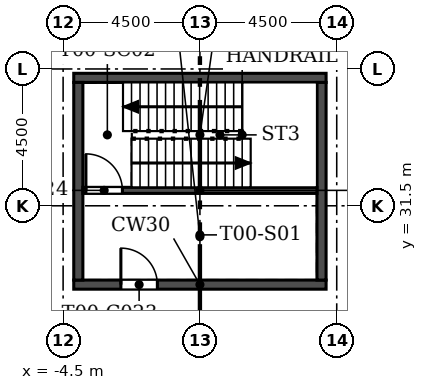
"""IFC4 building model, lengths in metres.
Left out: names, types, materials, properties, quantities, classifications, styles, units other than length and angle.
Written with IfcOpenShell. Run it as: python <this file> out.ifc"""

import sys

from ifc_helpers import new_model, si_unit, direction, frame, frame_2d, origin, place, context, subcontext, project, spatial, rectangle, extrude, element, fill, save


model = new_model("IFC4")
c1 = context("Model", 3, precision=1e-05, world=origin(), true_north=direction((0.0, 1.0)))
c2 = subcontext(c1, "Body", "Model", "MODEL_VIEW")
j1 = project(units=[si_unit("LENGTHUNIT", "METRE"), si_unit("PLANEANGLEUNIT", "RADIAN")], contexts=[c1])
p1 = place(None, origin())
s1 = spatial("IfcSite", under=j1, at=p1, CompositionType="ELEMENT")
p2 = place(p1, origin())
s2 = spatial("IfcBuilding", under=s1, at=p2, CompositionType="ELEMENT")
p3 = place(p2, frame((0.0, 0.0, 25.0)))
s3 = spatial("IfcBuildingStorey", under=s2, at=p3, CompositionType="ELEMENT", Elevation=25.0)
p4 = place(p3, frame((32.353, 7.709, 0.0), z_axis=(0.0, 0.0, 1.0), x_axis=(-0.500000836325, 0.866024920931, 0.0)))
e1 = element("IfcWall", 1, at=p4, inside=s3, PredefinedType="SOLIDWALL", context=c2, shape_type="SweptSolid", body=[
    extrude(rectangle(XDim=56.0, YDim=0.34, at=frame_2d((28.0, 0.0))), origin(), (0.0, 0.0, 1.0), 4.2),
])
p5 = place(p4, frame((1.5, 0.0, 0.9)))
e2 = element("IfcOpeningElement", 2, at=p5, cuts=e1, PredefinedType="OPENING", context=c2, shape_type="SweptSolid", body=[
    extrude(rectangle(XDim=1.885, YDim=3.0, at=frame_2d((0.942, 1.5))), frame((0.0, 0.18, 0.0), z_axis=(0.0, -1.0, 0.0), x_axis=(1.0, 0.0, 0.0)), (0.0, 0.0, 1.0), 0.36),
])
p6 = place(p4, frame((4.5, 0.0, 0.9)))
e3 = element("IfcOpeningElement", 3, at=p6, cuts=e1, PredefinedType="OPENING", context=c2, shape_type="SweptSolid", body=[
    extrude(rectangle(XDim=1.885, YDim=3.0, at=frame_2d((0.942, 1.5))), frame((0.0, 0.18, 0.0), z_axis=(0.0, -1.0, 0.0), x_axis=(1.0, 0.0, 0.0)), (0.0, 0.0, 1.0), 0.36),
])
p7 = place(p4, frame((7.5, 0.0, 0.9)))
e4 = element("IfcOpeningElement", 4, at=p7, cuts=e1, PredefinedType="OPENING", context=c2, shape_type="SweptSolid", body=[
    extrude(rectangle(XDim=1.885, YDim=3.0, at=frame_2d((0.942, 1.5))), frame((0.0, 0.18, 0.0), z_axis=(0.0, -1.0, 0.0), x_axis=(1.0, 0.0, 0.0)), (0.0, 0.0, 1.0), 0.36),
])
p8 = place(p4, frame((10.5, 0.0, 0.9)))
e5 = element("IfcOpeningElement", 5, at=p8, cuts=e1, PredefinedType="OPENING", context=c2, shape_type="SweptSolid", body=[
    extrude(rectangle(XDim=1.885, YDim=3.0, at=frame_2d((0.942, 1.5))), frame((0.0, 0.18, 0.0), z_axis=(0.0, -1.0, 0.0), x_axis=(1.0, 0.0, 0.0)), (0.0, 0.0, 1.0), 0.36),
])
p9 = place(p4, frame((13.5, 0.0, 0.9)))
e6 = element("IfcOpeningElement", 6, at=p9, cuts=e1, PredefinedType="OPENING", context=c2, shape_type="SweptSolid", body=[
    extrude(rectangle(XDim=1.885, YDim=3.0, at=frame_2d((0.942, 1.5))), frame((0.0, 0.18, 0.0), z_axis=(0.0, -1.0, 0.0), x_axis=(1.0, 0.0, 0.0)), (0.0, 0.0, 1.0), 0.36),
])
p10 = place(p4, frame((16.5, 0.0, 0.9)))
e7 = element("IfcOpeningElement", 7, at=p10, cuts=e1, PredefinedType="OPENING", context=c2, shape_type="SweptSolid", body=[
    extrude(rectangle(XDim=1.885, YDim=3.0, at=frame_2d((0.942, 1.5))), frame((0.0, 0.18, 0.0), z_axis=(0.0, -1.0, 0.0), x_axis=(1.0, 0.0, 0.0)), (0.0, 0.0, 1.0), 0.36),
])
p11 = place(p4, frame((19.5, 0.0, 0.9)))
e8 = element("IfcOpeningElement", 8, at=p11, cuts=e1, PredefinedType="OPENING", context=c2, shape_type="SweptSolid", body=[
    extrude(rectangle(XDim=1.885, YDim=3.0, at=frame_2d((0.942, 1.5))), frame((0.0, 0.18, 0.0), z_axis=(0.0, -1.0, 0.0), x_axis=(1.0, 0.0, 0.0)), (0.0, 0.0, 1.0), 0.36),
])
p12 = place(p4, frame((22.5, 0.0, 0.9)))
e9 = element("IfcOpeningElement", 9, at=p12, cuts=e1, PredefinedType="OPENING", context=c2, shape_type="SweptSolid", body=[
    extrude(rectangle(XDim=1.885, YDim=3.0, at=frame_2d((0.942, 1.5))), frame((0.0, 0.18, 0.0), z_axis=(0.0, -1.0, 0.0), x_axis=(1.0, 0.0, 0.0)), (0.0, 0.0, 1.0), 0.36),
])
p13 = place(p4, frame((25.5, 0.0, 0.9)))
e10 = element("IfcOpeningElement", 10, at=p13, cuts=e1, PredefinedType="OPENING", context=c2, shape_type="SweptSolid", body=[
    extrude(rectangle(XDim=1.885, YDim=3.0, at=frame_2d((0.942, 1.5))), frame((0.0, 0.18, 0.0), z_axis=(0.0, -1.0, 0.0), x_axis=(1.0, 0.0, 0.0)), (0.0, 0.0, 1.0), 0.36),
])
p14 = place(p4, frame((28.5, 0.0, 0.9)))
e11 = element("IfcOpeningElement", 11, at=p14, cuts=e1, PredefinedType="OPENING", context=c2, shape_type="SweptSolid", body=[
    extrude(rectangle(XDim=1.885, YDim=3.0, at=frame_2d((0.942, 1.5))), frame((0.0, 0.18, 0.0), z_axis=(0.0, -1.0, 0.0), x_axis=(1.0, 0.0, 0.0)), (0.0, 0.0, 1.0), 0.36),
])
p15 = place(p4, frame((31.5, 0.0, 0.0)))
e12 = element("IfcOpeningElement", 12, at=p15, cuts=e1, PredefinedType="OPENING", context=c2, shape_type="SweptSolid", body=[
    extrude(rectangle(XDim=1.885, YDim=2.6, at=frame_2d((0.942, 1.3))), frame((0.0, 0.18, 0.0), z_axis=(0.0, -1.0, 0.0), x_axis=(1.0, 0.0, 0.0)), (0.0, 0.0, 1.0), 0.36),
])
p16 = place(p4, frame((34.5, 0.0, 0.9)))
e13 = element("IfcOpeningElement", 13, at=p16, cuts=e1, PredefinedType="OPENING", context=c2, shape_type="SweptSolid", body=[
    extrude(rectangle(XDim=1.885, YDim=3.0, at=frame_2d((0.942, 1.5))), frame((0.0, 0.18, 0.0), z_axis=(0.0, -1.0, 0.0), x_axis=(1.0, 0.0, 0.0)), (0.0, 0.0, 1.0), 0.36),
])
p17 = place(p4, frame((37.5, 0.0, 0.9)))
e14 = element("IfcOpeningElement", 14, at=p17, cuts=e1, PredefinedType="OPENING", context=c2, shape_type="SweptSolid", body=[
    extrude(rectangle(XDim=1.885, YDim=3.0, at=frame_2d((0.942, 1.5))), frame((0.0, 0.18, 0.0), z_axis=(0.0, -1.0, 0.0), x_axis=(1.0, 0.0, 0.0)), (0.0, 0.0, 1.0), 0.36),
])
p18 = place(p4, frame((40.5, 0.0, 0.9)))
e15 = element("IfcOpeningElement", 15, at=p18, cuts=e1, PredefinedType="OPENING", context=c2, shape_type="SweptSolid", body=[
    extrude(rectangle(XDim=1.885, YDim=3.0, at=frame_2d((0.942, 1.5))), frame((0.0, 0.18, 0.0), z_axis=(0.0, -1.0, 0.0), x_axis=(1.0, 0.0, 0.0)), (0.0, 0.0, 1.0), 0.36),
])
p19 = place(p4, frame((43.5, 0.0, 0.9)))
e16 = element("IfcOpeningElement", 16, at=p19, cuts=e1, PredefinedType="OPENING", context=c2, shape_type="SweptSolid", body=[
    extrude(rectangle(XDim=1.885, YDim=3.0, at=frame_2d((0.942, 1.5))), frame((0.0, 0.18, 0.0), z_axis=(0.0, -1.0, 0.0), x_axis=(1.0, 0.0, 0.0)), (0.0, 0.0, 1.0), 0.36),
])
p20 = place(p4, frame((46.5, 0.0, 0.9)))
e17 = element("IfcOpeningElement", 17, at=p20, cuts=e1, PredefinedType="OPENING", context=c2, shape_type="SweptSolid", body=[
    extrude(rectangle(XDim=1.885, YDim=3.0, at=frame_2d((0.942, 1.5))), frame((0.0, 0.18, 0.0), z_axis=(0.0, -1.0, 0.0), x_axis=(1.0, 0.0, 0.0)), (0.0, 0.0, 1.0), 0.36),
])
p21 = place(p4, frame((49.5, 0.0, 0.9)))
e18 = element("IfcOpeningElement", 18, at=p21, cuts=e1, PredefinedType="OPENING", context=c2, shape_type="SweptSolid", body=[
    extrude(rectangle(XDim=1.885, YDim=3.0, at=frame_2d((0.942, 1.5))), frame((0.0, 0.18, 0.0), z_axis=(0.0, -1.0, 0.0), x_axis=(1.0, 0.0, 0.0)), (0.0, 0.0, 1.0), 0.36),
])
p22 = place(p4, frame((52.5, 0.0, 0.9)))
e19 = element("IfcOpeningElement", 19, at=p22, cuts=e1, PredefinedType="OPENING", context=c2, shape_type="SweptSolid", body=[
    extrude(rectangle(XDim=1.885, YDim=3.0, at=frame_2d((0.942, 1.5))), frame((0.0, 0.18, 0.0), z_axis=(0.0, -1.0, 0.0), x_axis=(1.0, 0.0, 0.0)), (0.0, 0.0, 1.0), 0.36),
])
p23 = place(p3, frame((-4.353, 56.207, 0.0), z_axis=(0.0, 0.0, 1.0), x_axis=(-0.500000836325, -0.866024920931, 0.0)))
e20 = element("IfcWall", 20, at=p23, inside=s3, PredefinedType="SOLIDWALL", context=c2, shape_type="SweptSolid", body=[
    extrude(rectangle(XDim=56.0, YDim=0.34, at=frame_2d((28.0, 0.0))), origin(), (0.0, 0.0, 1.0), 4.2),
])
p24 = place(p23, frame((1.5, 0.0, 0.9)))
e21 = element("IfcOpeningElement", 21, at=p24, cuts=e20, PredefinedType="OPENING", context=c2, shape_type="SweptSolid", body=[
    extrude(rectangle(XDim=1.885, YDim=3.0, at=frame_2d((0.942, 1.5))), frame((0.0, 0.18, 0.0), z_axis=(0.0, -1.0, 0.0), x_axis=(1.0, 0.0, 0.0)), (0.0, 0.0, 1.0), 0.36),
])
p25 = place(p23, frame((4.5, 0.0, 0.9)))
e22 = element("IfcOpeningElement", 22, at=p25, cuts=e20, PredefinedType="OPENING", context=c2, shape_type="SweptSolid", body=[
    extrude(rectangle(XDim=1.885, YDim=3.0, at=frame_2d((0.942, 1.5))), frame((0.0, 0.18, 0.0), z_axis=(0.0, -1.0, 0.0), x_axis=(1.0, 0.0, 0.0)), (0.0, 0.0, 1.0), 0.36),
])
p26 = place(p23, frame((7.5, 0.0, 0.9)))
e23 = element("IfcOpeningElement", 23, at=p26, cuts=e20, PredefinedType="OPENING", context=c2, shape_type="SweptSolid", body=[
    extrude(rectangle(XDim=1.885, YDim=3.0, at=frame_2d((0.942, 1.5))), frame((0.0, 0.18, 0.0), z_axis=(0.0, -1.0, 0.0), x_axis=(1.0, 0.0, 0.0)), (0.0, 0.0, 1.0), 0.36),
])
p27 = place(p23, frame((10.5, 0.0, 0.9)))
e24 = element("IfcOpeningElement", 24, at=p27, cuts=e20, PredefinedType="OPENING", context=c2, shape_type="SweptSolid", body=[
    extrude(rectangle(XDim=1.885, YDim=3.0, at=frame_2d((0.942, 1.5))), frame((0.0, 0.18, 0.0), z_axis=(0.0, -1.0, 0.0), x_axis=(1.0, 0.0, 0.0)), (0.0, 0.0, 1.0), 0.36),
])
p28 = place(p23, frame((13.5, 0.0, 0.9)))
e25 = element("IfcOpeningElement", 25, at=p28, cuts=e20, PredefinedType="OPENING", context=c2, shape_type="SweptSolid", body=[
    extrude(rectangle(XDim=1.885, YDim=3.0, at=frame_2d((0.942, 1.5))), frame((0.0, 0.18, 0.0), z_axis=(0.0, -1.0, 0.0), x_axis=(1.0, 0.0, 0.0)), (0.0, 0.0, 1.0), 0.36),
])
p29 = place(p23, frame((16.5, 0.0, 0.9)))
e26 = element("IfcOpeningElement", 26, at=p29, cuts=e20, PredefinedType="OPENING", context=c2, shape_type="SweptSolid", body=[
    extrude(rectangle(XDim=1.885, YDim=3.0, at=frame_2d((0.942, 1.5))), frame((0.0, 0.18, 0.0), z_axis=(0.0, -1.0, 0.0), x_axis=(1.0, 0.0, 0.0)), (0.0, 0.0, 1.0), 0.36),
])
p30 = place(p23, frame((19.5, 0.0, 0.9)))
e27 = element("IfcOpeningElement", 27, at=p30, cuts=e20, PredefinedType="OPENING", context=c2, shape_type="SweptSolid", body=[
    extrude(rectangle(XDim=1.885, YDim=3.0, at=frame_2d((0.942, 1.5))), frame((0.0, 0.18, 0.0), z_axis=(0.0, -1.0, 0.0), x_axis=(1.0, 0.0, 0.0)), (0.0, 0.0, 1.0), 0.36),
])
p31 = place(p23, frame((22.5, 0.0, 0.9)))
e28 = element("IfcOpeningElement", 28, at=p31, cuts=e20, PredefinedType="OPENING", context=c2, shape_type="SweptSolid", body=[
    extrude(rectangle(XDim=1.885, YDim=3.0, at=frame_2d((0.942, 1.5))), frame((0.0, 0.18, 0.0), z_axis=(0.0, -1.0, 0.0), x_axis=(1.0, 0.0, 0.0)), (0.0, 0.0, 1.0), 0.36),
])
p32 = place(p23, frame((25.5, 0.0, 0.0)))
e29 = element("IfcOpeningElement", 29, at=p32, cuts=e20, PredefinedType="OPENING", context=c2, shape_type="SweptSolid", body=[
    extrude(rectangle(XDim=1.885, YDim=2.6, at=frame_2d((0.942, 1.3))), frame((0.0, 0.18, 0.0), z_axis=(0.0, -1.0, 0.0), x_axis=(1.0, 0.0, 0.0)), (0.0, 0.0, 1.0), 0.36),
])
p33 = place(p23, frame((28.5, 0.0, 0.9)))
e30 = element("IfcOpeningElement", 30, at=p33, cuts=e20, PredefinedType="OPENING", context=c2, shape_type="SweptSolid", body=[
    extrude(rectangle(XDim=1.885, YDim=3.0, at=frame_2d((0.942, 1.5))), frame((0.0, 0.18, 0.0), z_axis=(0.0, -1.0, 0.0), x_axis=(1.0, 0.0, 0.0)), (0.0, 0.0, 1.0), 0.36),
])
p34 = place(p23, frame((31.5, 0.0, 0.9)))
e31 = element("IfcOpeningElement", 31, at=p34, cuts=e20, PredefinedType="OPENING", context=c2, shape_type="SweptSolid", body=[
    extrude(rectangle(XDim=1.885, YDim=3.0, at=frame_2d((0.942, 1.5))), frame((0.0, 0.18, 0.0), z_axis=(0.0, -1.0, 0.0), x_axis=(1.0, 0.0, 0.0)), (0.0, 0.0, 1.0), 0.36),
])
p35 = place(p23, frame((34.5, 0.0, 0.9)))
e32 = element("IfcOpeningElement", 32, at=p35, cuts=e20, PredefinedType="OPENING", context=c2, shape_type="SweptSolid", body=[
    extrude(rectangle(XDim=1.885, YDim=3.0, at=frame_2d((0.942, 1.5))), frame((0.0, 0.18, 0.0), z_axis=(0.0, -1.0, 0.0), x_axis=(1.0, 0.0, 0.0)), (0.0, 0.0, 1.0), 0.36),
])
p36 = place(p23, frame((37.5, 0.0, 0.9)))
e33 = element("IfcOpeningElement", 33, at=p36, cuts=e20, PredefinedType="OPENING", context=c2, shape_type="SweptSolid", body=[
    extrude(rectangle(XDim=1.885, YDim=3.0, at=frame_2d((0.942, 1.5))), frame((0.0, 0.18, 0.0), z_axis=(0.0, -1.0, 0.0), x_axis=(1.0, 0.0, 0.0)), (0.0, 0.0, 1.0), 0.36),
])
p37 = place(p23, frame((40.5, 0.0, 0.9)))
e34 = element("IfcOpeningElement", 34, at=p37, cuts=e20, PredefinedType="OPENING", context=c2, shape_type="SweptSolid", body=[
    extrude(rectangle(XDim=1.885, YDim=3.0, at=frame_2d((0.942, 1.5))), frame((0.0, 0.18, 0.0), z_axis=(0.0, -1.0, 0.0), x_axis=(1.0, 0.0, 0.0)), (0.0, 0.0, 1.0), 0.36),
])
p38 = place(p23, frame((43.5, 0.0, 0.9)))
e35 = element("IfcOpeningElement", 35, at=p38, cuts=e20, PredefinedType="OPENING", context=c2, shape_type="SweptSolid", body=[
    extrude(rectangle(XDim=1.885, YDim=3.0, at=frame_2d((0.942, 1.5))), frame((0.0, 0.18, 0.0), z_axis=(0.0, -1.0, 0.0), x_axis=(1.0, 0.0, 0.0)), (0.0, 0.0, 1.0), 0.36),
])
p39 = place(p23, frame((46.5, 0.0, 0.9)))
e36 = element("IfcOpeningElement", 36, at=p39, cuts=e20, PredefinedType="OPENING", context=c2, shape_type="SweptSolid", body=[
    extrude(rectangle(XDim=1.885, YDim=3.0, at=frame_2d((0.942, 1.5))), frame((0.0, 0.18, 0.0), z_axis=(0.0, -1.0, 0.0), x_axis=(1.0, 0.0, 0.0)), (0.0, 0.0, 1.0), 0.36),
])
p40 = place(p23, frame((49.5, 0.0, 0.9)))
e37 = element("IfcOpeningElement", 37, at=p40, cuts=e20, PredefinedType="OPENING", context=c2, shape_type="SweptSolid", body=[
    extrude(rectangle(XDim=1.885, YDim=3.0, at=frame_2d((0.942, 1.5))), frame((0.0, 0.18, 0.0), z_axis=(0.0, -1.0, 0.0), x_axis=(1.0, 0.0, 0.0)), (0.0, 0.0, 1.0), 0.36),
])
p41 = place(p23, frame((52.5, 0.0, 0.9)))
e38 = element("IfcOpeningElement", 38, at=p41, cuts=e20, PredefinedType="OPENING", context=c2, shape_type="SweptSolid", body=[
    extrude(rectangle(XDim=1.885, YDim=3.0, at=frame_2d((0.942, 1.5))), frame((0.0, 0.18, 0.0), z_axis=(0.0, -1.0, 0.0), x_axis=(1.0, 0.0, 0.0)), (0.0, 0.0, 1.0), 0.36),
])
p42 = place(p3, frame((-4.15, 28.907, -2.0), z_axis=(0.0, 0.0, 1.0), x_axis=(1.0, 0.0, 0.0)))
e39 = element("IfcWall", 39, at=p42, inside=s3, PredefinedType="SOLIDWALL", context=c2, shape_type="SweptSolid", body=[
    extrude(rectangle(XDim=8.3, YDim=0.3, at=frame_2d((4.15, 0.0))), origin(), (0.0, 0.0, 1.0), 6.2),
])
p43 = place(p42, frame((1.55, 0.0, 2.0)))
e40 = element("IfcOpeningElement", 40, at=p43, cuts=e39, PredefinedType="OPENING", context=c2, shape_type="SweptSolid", body=[
    extrude(rectangle(XDim=1.2, YDim=2.1, at=frame_2d((0.6, 1.05))), frame((0.0, 0.16, 0.0), z_axis=(0.0, -1.0, 0.0), x_axis=(1.0, 0.0, 0.0)), (0.0, 0.0, 1.0), 0.32),
])
p44 = place(p3, frame((-4.15, 35.707, -2.0), z_axis=(0.0, 0.0, 1.0), x_axis=(1.0, 0.0, 0.0)))
e41 = element("IfcWall", 41, at=p44, inside=s3, PredefinedType="SOLIDWALL", context=c2, shape_type="SweptSolid", body=[
    extrude(rectangle(XDim=8.3, YDim=0.3, at=frame_2d((4.15, 0.0))), origin(), (0.0, 0.0, 1.0), 6.2),
])
for number, where, z_axis, x_axis in (
    (42, (-4.0, 29.057, -2.0), (0.0, 0.0, 1.0), (0.0, 1.0, 0.0)),
    (43, (4.0, 29.057, -2.0), (0.0, 0.0, 1.0), (0.0, 1.0, 0.0)),
):
    element("IfcWall", number, at=place(p3, frame(where, z_axis=z_axis, x_axis=x_axis)), inside=s3, PredefinedType="SOLIDWALL", context=c2, shape_type="SweptSolid", body=[
        extrude(rectangle(XDim=6.5, YDim=0.3, at=frame_2d((3.25, 0.0))), origin(), (0.0, 0.0, 1.0), 6.2),
    ])
p45 = place(p3, frame((-3.85, 32.007, -2.0), z_axis=(0.0, 0.0, 1.0), x_axis=(1.0, 0.0, 0.0)))
e44 = element("IfcWall", 44, at=p45, inside=s3, PredefinedType="SOLIDWALL", context=c2, shape_type="SweptSolid", body=[
    extrude(rectangle(XDim=7.7, YDim=0.2, at=frame_2d((3.85, 0.0))), origin(), (0.0, 0.0, 1.0), 6.2),
])
p46 = place(p45, frame((0.1, 0.0, 2.0)))
e45 = element("IfcOpeningElement", 45, at=p46, cuts=e44, PredefinedType="OPENING", context=c2, shape_type="SweptSolid", body=[
    extrude(rectangle(XDim=1.2, YDim=2.1, at=frame_2d((0.6, 1.05))), frame((0.0, 0.11, 0.0), z_axis=(0.0, -1.0, 0.0), x_axis=(1.0, 0.0, 0.0)), (0.0, 0.0, 1.0), 0.22),
])
p47 = place(p43, origin())
e46 = element("IfcDoor", 46, at=p47, inside=s3, OperationType="SINGLE_SWING_LEFT", PredefinedType="DOOR", context=c2, shape_type="SweptSolid", body=[
    extrude(rectangle(XDim=1.2, YDim=2.1, at=frame_2d((0.6, 1.05))), frame((0.0, 0.025, 0.0), z_axis=(0.0, -1.0, 0.0), x_axis=(1.0, 0.0, 0.0)), (0.0, 0.0, 1.0), 0.05),
])
fill(e40, e46)
p48 = place(p46, origin())
e47 = element("IfcDoor", 47, at=p48, inside=s3, OperationType="SINGLE_SWING_LEFT", PredefinedType="DOOR", context=c2, shape_type="SweptSolid", body=[
    extrude(rectangle(XDim=1.2, YDim=2.1, at=frame_2d((0.6, 1.05))), frame((0.0, 0.025, 0.0), z_axis=(0.0, -1.0, 0.0), x_axis=(1.0, 0.0, 0.0)), (0.0, 0.0, 1.0), 0.05),
])
fill(e45, e47)
save(model, sys.argv[1])
